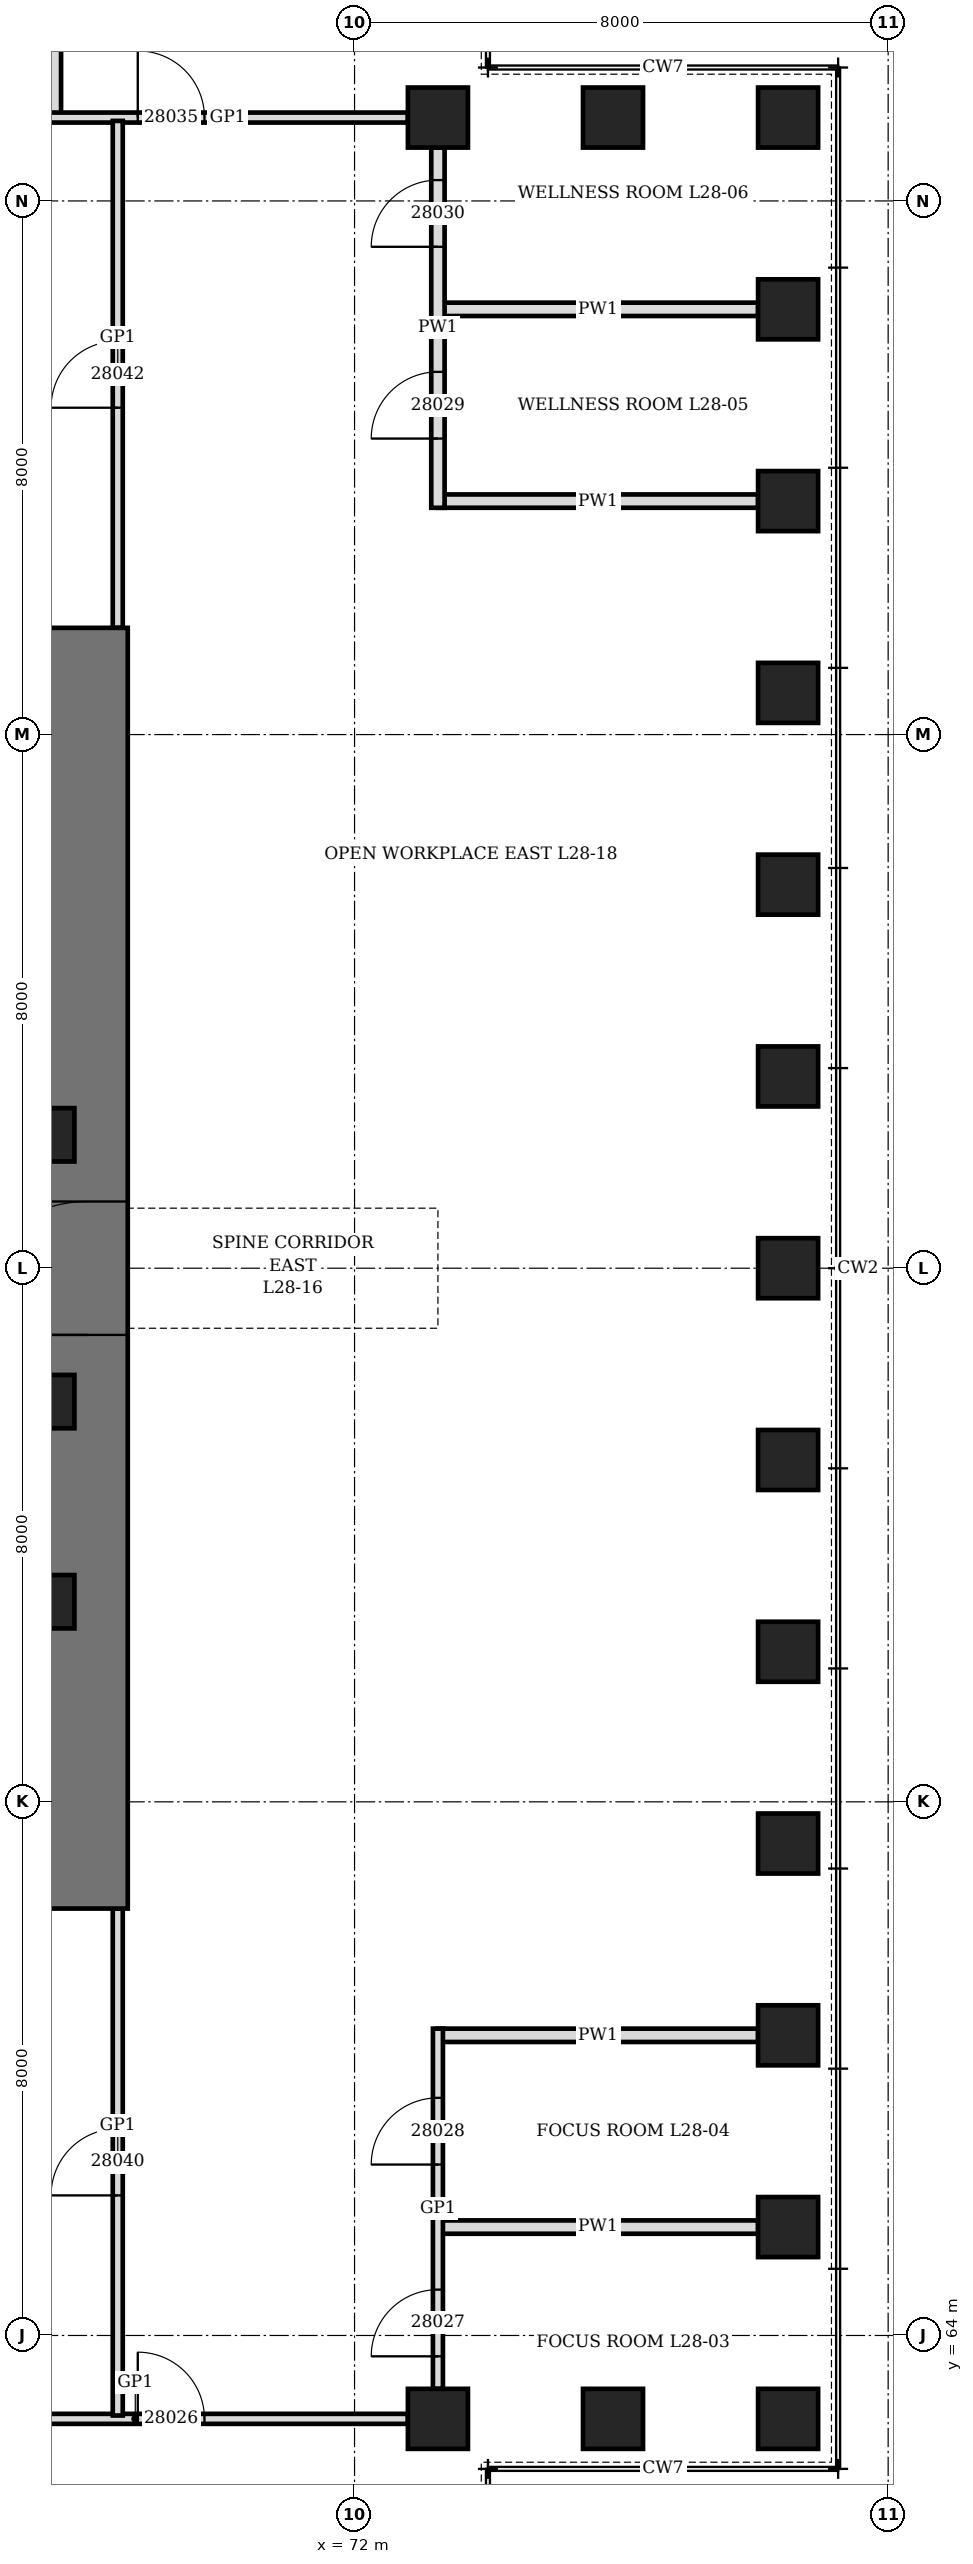
"""IFC4 building model, lengths in metres.
Left out: names, types, materials, properties, quantities, classifications, styles, units other than length and angle.
Written with IfcOpenShell. Run it as: python <this file> out.ifc"""

import sys

from ifc_helpers import new_model, si_unit, direction, frame, frame_2d, origin, origin_2d, place, context, subcontext, project, spatial, rectangle, hollow_rectangle, extrude, element, fill, save


model = new_model("IFC4")
c1 = context("Model", 3, precision=1e-05, world=origin(), true_north=direction((0.0, 1.0)))
c2 = subcontext(c1, "Body", "Model", "MODEL_VIEW")
j1 = project(units=[si_unit("LENGTHUNIT", "METRE"), si_unit("PLANEANGLEUNIT", "RADIAN")], contexts=[c1])
p1 = place(None, origin())
s1 = spatial("IfcSite", under=j1, at=p1, CompositionType="ELEMENT")
p2 = place(p1, origin())
s2 = spatial("IfcBuilding", under=s1, at=p2, CompositionType="ELEMENT")
p3 = place(p2, frame((0.0, 0.0, 129.1)))
s3 = spatial("IfcBuildingStorey", under=s2, at=p3, CompositionType="ELEMENT", Elevation=129.1)
for number, where, z_axis, x_axis in (
    (1, (73.25, 62.75, 0.0), (0.0, 0.0, 1.0), (1.0, 0.0, 0.0)),
    (2, (75.875, 62.75, 0.0), (0.0, 0.0, 1.0), (1.0, 0.0, 0.0)),
    (3, (78.5, 62.75, 0.0), (0.0, 0.0, 1.0), (0.0, 1.0, 0.0)),
    (4, (78.5, 65.625, 0.0), (0.0, 0.0, 1.0), (0.0, 1.0, 0.0)),
    (5, (78.5, 68.5, 0.0), (0.0, 0.0, 1.0), (0.0, 1.0, 0.0)),
    (6, (78.5, 71.375, 0.0), (0.0, 0.0, 1.0), (0.0, 1.0, 0.0)),
    (7, (78.5, 74.25, 0.0), (0.0, 0.0, 1.0), (0.0, 1.0, 0.0)),
    (8, (78.5, 77.125, 0.0), (0.0, 0.0, 1.0), (0.0, 1.0, 0.0)),
    (9, (78.5, 80.0, 0.0), (0.0, 0.0, 1.0), (0.0, 1.0, 0.0)),
    (10, (78.5, 82.875, 0.0), (0.0, 0.0, 1.0), (0.0, 1.0, 0.0)),
    (11, (78.5, 85.75, 0.0), (0.0, 0.0, 1.0), (0.0, 1.0, 0.0)),
    (12, (78.5, 88.625, 0.0), (0.0, 0.0, 1.0), (0.0, 1.0, 0.0)),
    (13, (78.5, 91.5, 0.0), (0.0, 0.0, 1.0), (0.0, 1.0, 0.0)),
    (14, (78.5, 94.375, 0.0), (0.0, 0.0, 1.0), (0.0, 1.0, 0.0)),
    (15, (78.5, 97.25, 0.0), (0.0, 0.0, 1.0), (1.0, 0.0, 0.0)),
    (16, (75.875, 97.25, 0.0), (0.0, 0.0, 1.0), (1.0, 0.0, 0.0)),
    (17, (73.25, 97.25, 0.0), (0.0, 0.0, 1.0), (0.0, 1.0, 0.0)),
):
    element("IfcColumn", number, at=place(p3, frame(where, z_axis=z_axis, x_axis=x_axis)), inside=s3, PredefinedType="COLUMN", context=c2, shape_type="SweptSolid", body=[
        extrude(hollow_rectangle(XDim=0.9, YDim=0.9, WallThickness=0.15, at=origin_2d()), origin(), (0.0, 0.0, 1.0), 4.2),
    ])
p4 = place(p3, frame((68.0, 70.4, 0.0), z_axis=(0.0, 0.0, 1.0), x_axis=(0.0, 1.0, 0.0)))
e18 = element("IfcWall", 18, at=p4, inside=s3, PredefinedType="SHEAR", context=c2, shape_type="SweptSolid", body=[
    extrude(rectangle(XDim=19.2, YDim=1.2, at=frame_2d((9.6, 0.0))), origin(), (0.0, 0.0, 1.0), 4.2),
])
p5 = place(p4, frame((8.6, 0.0, 0.0)))
e19 = element("IfcOpeningElement", 19, at=p5, cuts=e18, PredefinedType="OPENING", context=c2, shape_type="SweptSolid", body=[
    extrude(rectangle(XDim=2.0, YDim=2.4, at=frame_2d((1.0, 1.2))), frame((0.0, 0.61, 0.0), z_axis=(0.0, -1.0, 0.0), x_axis=(1.0, 0.0, 0.0)), (0.0, 0.0, 1.0), 1.22),
])
for number, where, z_axis, x_axis in (
    (20, (67.4, 75.0, 0.0), (0.0, 0.0, 1.0), (1.0, 0.0, 0.0)),
    (21, (67.4, 78.0, 0.0), (0.0, 0.0, 1.0), (1.0, 0.0, 0.0)),
    (22, (67.4, 82.0, 0.0), (0.0, 0.0, 1.0), (1.0, 0.0, 0.0)),
):
    element("IfcColumn", number, at=place(p3, frame(where, z_axis=z_axis, x_axis=x_axis)), inside=s3, PredefinedType="COLUMN", context=c2, shape_type="SweptSolid", body=[
        extrude(hollow_rectangle(XDim=0.8, YDim=0.8, WallThickness=0.1, at=origin_2d()), origin(), (0.0, 0.0, 1.0), 4.2),
    ])
for number, where, z_axis, x_axis in (
    (23, (73.25, 65.625, 0.0), (0.0, 0.0, 1.0), (1.0, 0.0, 0.0)),
    (24, (73.25, 68.5, 0.0), (0.0, 0.0, 1.0), (1.0, 0.0, 0.0)),
    (25, (73.25, 91.5, 0.0), (0.0, 0.0, 1.0), (1.0, 0.0, 0.0)),
    (26, (73.25, 94.375, 0.0), (0.0, 0.0, 1.0), (1.0, 0.0, 0.0)),
):
    element("IfcWall", number, at=place(p3, frame(where, z_axis=z_axis, x_axis=x_axis)), inside=s3, PredefinedType="PARTITIONING", context=c2, shape_type="SweptSolid", body=[
        extrude(rectangle(XDim=4.8, YDim=0.2, at=frame_2d((2.4, 0.0))), origin(), (0.0, 0.0, 1.0), 3.428),
    ])
p6 = place(p3, frame((67.5, 97.25, 0.0), z_axis=(0.0, 0.0, 1.0), x_axis=(0.0, 1.0, 0.0)))
e27 = element("IfcWall", 27, at=p6, inside=s3, PredefinedType="PARTITIONING", context=c2, shape_type="SweptSolid", body=[
    extrude(rectangle(XDim=4.8, YDim=0.2, at=frame_2d((2.4, 0.0))), origin(), (0.0, 0.0, 1.0), 2.74),
])
p7 = place(p3, frame((64.625, 62.75, 0.0), z_axis=(0.0, 0.0, 1.0), x_axis=(1.0, 0.0, 0.0)))
e28 = element("IfcWall", 28, at=p7, inside=s3, PredefinedType="PARTITIONING", context=c2, shape_type="SweptSolid", body=[
    extrude(rectangle(XDim=8.175, YDim=0.15, at=frame_2d((4.087, 0.0))), origin(), (0.0, 0.0, 1.0), 4.04),
])
p8 = place(p7, frame((4.125, 0.0, 0.0)))
e29 = element("IfcOpeningElement", 29, at=p8, cuts=e28, PredefinedType="OPENING", context=c2, shape_type="SweptSolid", body=[
    extrude(rectangle(XDim=1.0, YDim=2.4, at=frame_2d((0.5, 1.2))), frame((0.0, 0.085, 0.0), z_axis=(0.0, -1.0, 0.0), x_axis=(1.0, 0.0, 0.0)), (0.0, 0.0, 1.0), 0.17),
])
p9 = place(p3, frame((67.4, 97.25, 0.0), z_axis=(0.0, 0.0, 1.0), x_axis=(1.0, 0.0, 0.0)))
e30 = element("IfcWall", 30, at=p9, inside=s3, PredefinedType="PARTITIONING", context=c2, shape_type="SweptSolid", body=[
    extrude(rectangle(XDim=5.4, YDim=0.15, at=frame_2d((2.7, 0.0))), origin(), (0.0, 0.0, 1.0), 4.04),
])
p10 = place(p9, frame((1.35, 0.0, 0.0)))
e31 = element("IfcOpeningElement", 31, at=p10, cuts=e30, PredefinedType="OPENING", context=c2, shape_type="SweptSolid", body=[
    extrude(rectangle(XDim=1.0, YDim=2.1, at=frame_2d((0.5, 1.05))), frame((0.0, 0.085, 0.0), z_axis=(0.0, -1.0, 0.0), x_axis=(1.0, 0.0, 0.0)), (0.0, 0.0, 1.0), 0.17),
])
p11 = place(p3, frame((68.45, 62.8, 0.0), z_axis=(0.0, 0.0, 1.0), x_axis=(0.0, 1.0, 0.0)))
e32 = element("IfcWall", 32, at=p11, inside=s3, PredefinedType="PARTITIONING", context=c2, shape_type="SweptSolid", body=[
    extrude(rectangle(XDim=7.6, YDim=0.15, at=frame_2d((3.8, 0.0))), origin(), (0.0, 0.0, 1.0), 4.04),
])
p12 = place(p11, frame((3.3, 0.0, 0.0)))
e33 = element("IfcOpeningElement", 33, at=p12, cuts=e32, PredefinedType="OPENING", context=c2, shape_type="SweptSolid", body=[
    extrude(rectangle(XDim=1.0, YDim=2.4, at=frame_2d((0.5, 1.2))), frame((0.0, 0.085, 0.0), z_axis=(0.0, -1.0, 0.0), x_axis=(1.0, 0.0, 0.0)), (0.0, 0.0, 1.0), 0.17),
])
p13 = place(p3, frame((68.45, 89.6, 0.0), z_axis=(0.0, 0.0, 1.0), x_axis=(0.0, 1.0, 0.0)))
e34 = element("IfcWall", 34, at=p13, inside=s3, PredefinedType="PARTITIONING", context=c2, shape_type="SweptSolid", body=[
    extrude(rectangle(XDim=7.6, YDim=0.15, at=frame_2d((3.8, 0.0))), origin(), (0.0, 0.0, 1.0), 4.04),
])
p14 = place(p13, frame((3.3, 0.0, 0.0)))
e35 = element("IfcOpeningElement", 35, at=p14, cuts=e34, PredefinedType="OPENING", context=c2, shape_type="SweptSolid", body=[
    extrude(rectangle(XDim=1.0, YDim=2.4, at=frame_2d((0.5, 1.2))), frame((0.0, 0.085, 0.0), z_axis=(0.0, -1.0, 0.0), x_axis=(1.0, 0.0, 0.0)), (0.0, 0.0, 1.0), 0.17),
])
p15 = place(p3, frame((73.25, 63.2, 0.0), z_axis=(0.0, 0.0, 1.0), x_axis=(0.0, 1.0, 0.0)))
e36 = element("IfcWall", 36, at=p15, inside=s3, PredefinedType="PARTITIONING", context=c2, shape_type="SweptSolid", body=[
    extrude(rectangle(XDim=5.4, YDim=0.15, at=frame_2d((2.7, 0.0))), origin(), (0.0, 0.0, 1.0), 4.04),
])
p16 = place(p15, frame((0.488, 0.0, 0.0)))
e37 = element("IfcOpeningElement", 37, at=p16, cuts=e36, PredefinedType="OPENING", context=c2, shape_type="SweptSolid", body=[
    extrude(rectangle(XDim=1.0, YDim=2.4, at=frame_2d((0.5, 1.2))), frame((0.0, 0.085, 0.0), z_axis=(0.0, -1.0, 0.0), x_axis=(1.0, 0.0, 0.0)), (0.0, 0.0, 1.0), 0.17),
])
p17 = place(p15, frame((3.363, 0.0, 0.0)))
e38 = element("IfcOpeningElement", 38, at=p17, cuts=e36, PredefinedType="OPENING", context=c2, shape_type="SweptSolid", body=[
    extrude(rectangle(XDim=1.0, YDim=2.4, at=frame_2d((0.5, 1.2))), frame((0.0, 0.085, 0.0), z_axis=(0.0, -1.0, 0.0), x_axis=(1.0, 0.0, 0.0)), (0.0, 0.0, 1.0), 0.17),
])
p18 = place(p3, frame((73.25, 91.4, 0.0), z_axis=(0.0, 0.0, 1.0), x_axis=(0.0, 1.0, 0.0)))
e39 = element("IfcWall", 39, at=p18, inside=s3, PredefinedType="PARTITIONING", context=c2, shape_type="SweptSolid", body=[
    extrude(rectangle(XDim=5.4, YDim=0.2, at=frame_2d((2.7, 0.0))), origin(), (0.0, 0.0, 1.0), 4.04),
])
p19 = place(p18, frame((1.038, 0.0, 0.0)))
e40 = element("IfcOpeningElement", 40, at=p19, cuts=e39, PredefinedType="OPENING", context=c2, shape_type="SweptSolid", body=[
    extrude(rectangle(XDim=1.0, YDim=2.1, at=frame_2d((0.5, 1.05))), frame((0.0, 0.11, 0.0), z_axis=(0.0, -1.0, 0.0), x_axis=(1.0, 0.0, 0.0)), (0.0, 0.0, 1.0), 0.22),
])
p20 = place(p18, frame((3.913, 0.0, 0.0)))
e41 = element("IfcOpeningElement", 41, at=p20, cuts=e39, PredefinedType="OPENING", context=c2, shape_type="SweptSolid", body=[
    extrude(rectangle(XDim=1.0, YDim=2.1, at=frame_2d((0.5, 1.05))), frame((0.0, 0.11, 0.0), z_axis=(0.0, -1.0, 0.0), x_axis=(1.0, 0.0, 0.0)), (0.0, 0.0, 1.0), 0.22),
])
p21 = place(p5, origin())
e42 = element("IfcDoor", 42, at=p21, inside=s3, OperationType="DOUBLE_DOOR_SINGLE_SWING", PredefinedType="DOOR", context=c2, shape_type="SweptSolid", body=[
    extrude(rectangle(XDim=2.0, YDim=2.4, at=frame_2d((1.0, 1.2))), frame((0.0, 0.35, 0.0), z_axis=(0.0, -1.0, 0.0), x_axis=(1.0, 0.0, 0.0)), (0.0, 0.0, 1.0), 0.7),
])
fill(e19, e42)
p22 = place(p8, origin())
e43 = element("IfcDoor", 43, at=p22, inside=s3, OperationType="SINGLE_SWING_RIGHT", PredefinedType="DOOR", context=c2, shape_type="SweptSolid", body=[
    extrude(rectangle(XDim=1.0, YDim=2.4, at=frame_2d((0.5, 1.2))), frame((0.0, 0.075, 0.0), z_axis=(0.0, -1.0, 0.0), x_axis=(1.0, 0.0, 0.0)), (0.0, 0.0, 1.0), 0.149),
])
fill(e29, e43)
p23 = place(p16, origin())
e44 = element("IfcDoor", 44, at=p23, inside=s3, OperationType="SINGLE_SWING_RIGHT", PredefinedType="DOOR", context=c2, shape_type="SweptSolid", body=[
    extrude(rectangle(XDim=1.0, YDim=2.4, at=frame_2d((0.5, 1.2))), frame((0.0, 0.075, 0.0), z_axis=(0.0, -1.0, 0.0), x_axis=(1.0, 0.0, 0.0)), (0.0, 0.0, 1.0), 0.149),
])
fill(e37, e44)
p24 = place(p17, origin())
e45 = element("IfcDoor", 45, at=p24, inside=s3, OperationType="SINGLE_SWING_RIGHT", PredefinedType="DOOR", context=c2, shape_type="SweptSolid", body=[
    extrude(rectangle(XDim=1.0, YDim=2.4, at=frame_2d((0.5, 1.2))), frame((0.0, 0.075, 0.0), z_axis=(0.0, -1.0, 0.0), x_axis=(1.0, 0.0, 0.0)), (0.0, 0.0, 1.0), 0.149),
])
fill(e38, e45)
p25 = place(p19, origin())
e46 = element("IfcDoor", 46, at=p25, inside=s3, OperationType="SINGLE_SWING_LEFT", PredefinedType="DOOR", context=c2, shape_type="SweptSolid", body=[
    extrude(rectangle(XDim=1.0, YDim=2.1, at=frame_2d((0.5, 1.05))), frame((0.0, 0.1, 0.0), z_axis=(0.0, -1.0, 0.0), x_axis=(1.0, 0.0, 0.0)), (0.0, 0.0, 1.0), 0.199),
])
fill(e40, e46)
p26 = place(p20, origin())
e47 = element("IfcDoor", 47, at=p26, inside=s3, OperationType="SINGLE_SWING_LEFT", PredefinedType="DOOR", context=c2, shape_type="SweptSolid", body=[
    extrude(rectangle(XDim=1.0, YDim=2.1, at=frame_2d((0.5, 1.05))), frame((0.0, 0.1, 0.0), z_axis=(0.0, -1.0, 0.0), x_axis=(1.0, 0.0, 0.0)), (0.0, 0.0, 1.0), 0.199),
])
fill(e41, e47)
p27 = place(p10, origin())
e48 = element("IfcDoor", 48, at=p27, inside=s3, OperationType="SINGLE_SWING_LEFT", PredefinedType="DOOR", context=c2, shape_type="SweptSolid", body=[
    extrude(rectangle(XDim=1.0, YDim=2.1, at=frame_2d((0.5, 1.05))), frame((0.0, 0.075, 0.0), z_axis=(0.0, -1.0, 0.0), x_axis=(1.0, 0.0, 0.0)), (0.0, 0.0, 1.0), 0.149),
])
fill(e31, e48)
p28 = place(p12, origin())
e49 = element("IfcDoor", 49, at=p28, inside=s3, OperationType="SINGLE_SWING_RIGHT", PredefinedType="DOOR", context=c2, shape_type="SweptSolid", body=[
    extrude(rectangle(XDim=1.0, YDim=2.4, at=frame_2d((0.5, 1.2))), frame((0.0, 0.075, 0.0), z_axis=(0.0, -1.0, 0.0), x_axis=(1.0, 0.0, 0.0)), (0.0, 0.0, 1.0), 0.149),
])
fill(e33, e49)
p29 = place(p14, origin())
e50 = element("IfcDoor", 50, at=p29, inside=s3, OperationType="SINGLE_SWING_RIGHT", PredefinedType="DOOR", context=c2, shape_type="SweptSolid", body=[
    extrude(rectangle(XDim=1.0, YDim=2.4, at=frame_2d((0.5, 1.2))), frame((0.0, 0.075, 0.0), z_axis=(0.0, -1.0, 0.0), x_axis=(1.0, 0.0, 0.0)), (0.0, 0.0, 1.0), 0.149),
])
fill(e35, e50)
save(model, sys.argv[1])
